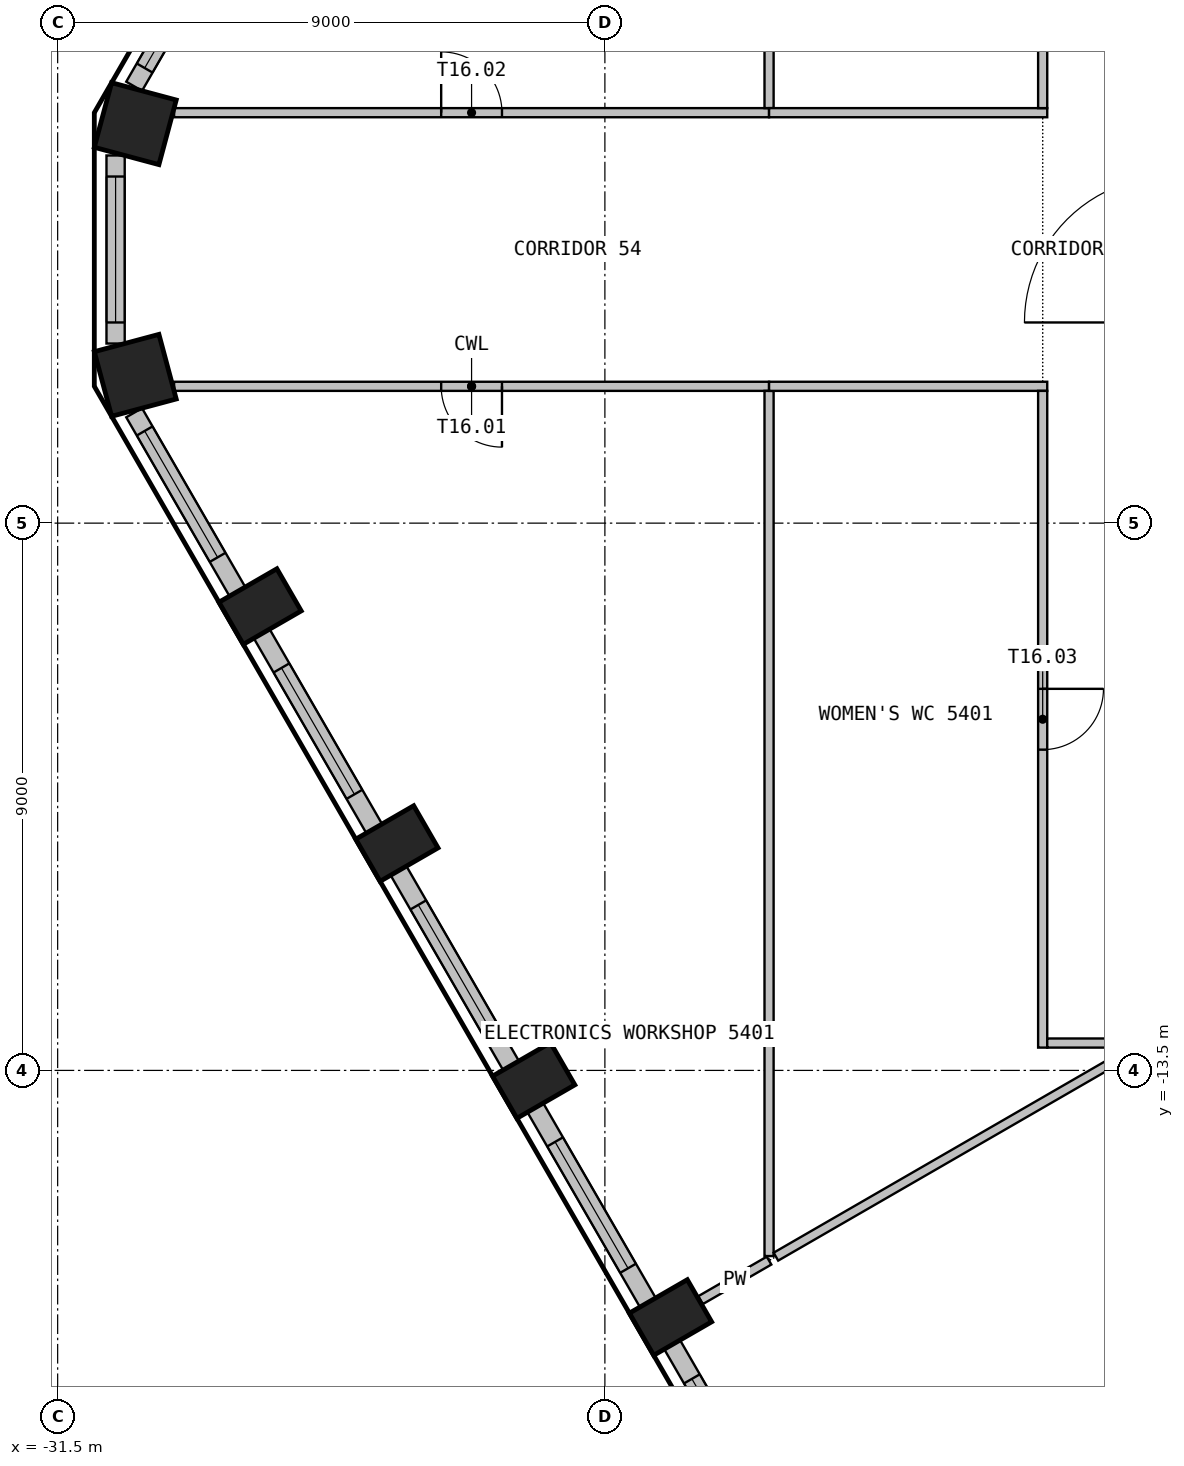
"""IFC4 building model, lengths in metres.
Left out: names, types, materials, properties, quantities, classifications, styles, units other than length and angle.
Written with IfcOpenShell. Run it as: python <this file> out.ifc"""

import sys

from ifc_helpers import new_model, si_unit, direction, frame, frame_2d, origin, origin_2d, place, context, subcontext, project, spatial, rectangle, extrude, element, fill, save


model = new_model("IFC4")
c1 = context("Model", 3, precision=1e-05, world=origin(), true_north=direction((0.0, 1.0)))
c2 = subcontext(c1, "Body", "Model", "MODEL_VIEW")
j1 = project(units=[si_unit("LENGTHUNIT", "METRE"), si_unit("PLANEANGLEUNIT", "RADIAN")], contexts=[c1])
p1 = place(None, origin())
s1 = spatial("IfcSite", under=j1, at=p1, CompositionType="ELEMENT")
p2 = place(p1, origin())
s2 = spatial("IfcBuilding", under=s1, at=p2, CompositionType="ELEMENT")
p3 = place(p2, frame((0.0, 0.0, 219.0)))
s3 = spatial("IfcBuildingStorey", under=s2, at=p3, CompositionType="ELEMENT", Elevation=219.0)
for number, where, z_axis, x_axis in (
    (1, (-30.223, 2.07, 0.0), (0.0, 0.0, 1.0), (-0.259, -0.966, 0.0)),
    (2, (-30.223, -2.07, 0.0), (0.0, 0.0, 1.0), (0.259, -0.966, 0.0)),
):
    element("IfcColumn", number, at=place(p3, frame(where, z_axis=z_axis, x_axis=x_axis)), inside=s3, PredefinedType="COLUMN", context=c2, shape_type="SweptSolid", body=[
        extrude(rectangle(XDim=1.1, YDim=1.1, at=origin_2d()), origin(), (0.0, 0.0, 1.0), 3.55),
    ])
for number, where, z_axis, x_axis in (
    (3, (-28.171, -5.872, 0.0), (0.0, 0.0, 1.0), (0.5, -0.866, 0.0)),
    (4, (-25.921, -9.769, 0.0), (0.0, 0.0, 1.0), (0.5, -0.866, 0.0)),
    (5, (-23.671, -13.666, 0.0), (0.0, 0.0, 1.0), (0.5, -0.866, 0.0)),
    (6, (-21.421, -17.563, 0.0), (0.0, 0.0, 1.0), (0.5, -0.866, 0.0)),
):
    element("IfcColumn", number, at=place(p3, frame(where, z_axis=z_axis, x_axis=x_axis)), inside=s3, PredefinedType="COLUMN", context=c2, shape_type="SweptSolid", body=[
        extrude(rectangle(XDim=0.8, YDim=1.1, at=origin_2d()), origin(), (0.0, 0.0, 1.0), 3.55),
    ])
p4 = place(p3, frame((-28.544, 5.625, 0.0), z_axis=(0.0, 0.0, 1.0), x_axis=(-0.500012868213, -0.866017974191, 0.0)))
e7 = element("IfcWall", 7, at=p4, inside=s3, PredefinedType="SOLIDWALL", context=c2, shape_type="SweptSolid", body=[
    extrude(rectangle(XDim=3.396, YDim=0.3, at=frame_2d((1.698, 0.0))), origin(), (0.0, 0.0, 1.0), 3.55),
])
p5 = place(p4, frame((0.649, 0.0, 0.9)))
e8 = element("IfcOpeningElement", 8, at=p5, cuts=e7, PredefinedType="OPENING", context=c2, shape_type="SweptSolid", body=[
    extrude(rectangle(XDim=2.4, YDim=2.1, at=frame_2d((1.2, 1.05))), frame((0.0, 0.16, 0.0), z_axis=(0.0, -1.0, 0.0), x_axis=(1.0, 0.0, 0.0)), (0.0, 0.0, 1.0), 0.32),
])
p6 = place(p3, frame((-30.547, 1.546, 0.0), z_axis=(0.0, 0.0, 1.0), x_axis=(0.0, -1.0, 0.0)))
e9 = element("IfcWall", 9, at=p6, inside=s3, PredefinedType="SOLIDWALL", context=c2, shape_type="SweptSolid", body=[
    extrude(rectangle(XDim=3.093, YDim=0.3, at=frame_2d((1.546, 0.0))), origin(), (0.0, 0.0, 1.0), 3.55),
])
p7 = place(p6, frame((0.346, 0.0, 0.9)))
e10 = element("IfcOpeningElement", 10, at=p7, cuts=e9, PredefinedType="OPENING", context=c2, shape_type="SweptSolid", body=[
    extrude(rectangle(XDim=2.4, YDim=2.1, at=frame_2d((1.2, 1.05))), frame((0.0, 0.16, 0.0), z_axis=(0.0, -1.0, 0.0), x_axis=(1.0, 0.0, 0.0)), (0.0, 0.0, 1.0), 0.32),
])
p8 = place(p3, frame((-30.242, -2.684, 0.0), z_axis=(0.0, 0.0, 1.0), x_axis=(0.500012868213, -0.866017974191, 0.0)))
e11 = element("IfcWall", 11, at=p8, inside=s3, PredefinedType="SOLIDWALL", context=c2, shape_type="SweptSolid", body=[
    extrude(rectangle(XDim=3.396, YDim=0.3, at=frame_2d((1.698, 0.0))), origin(), (0.0, 0.0, 1.0), 3.55),
])
p9 = place(p8, frame((0.346, 0.0, 0.9)))
e12 = element("IfcOpeningElement", 12, at=p9, cuts=e11, PredefinedType="OPENING", context=c2, shape_type="SweptSolid", body=[
    extrude(rectangle(XDim=2.4, YDim=2.1, at=frame_2d((1.2, 1.05))), frame((0.0, 0.16, 0.0), z_axis=(0.0, -1.0, 0.0), x_axis=(1.0, 0.0, 0.0)), (0.0, 0.0, 1.0), 0.32),
])
p10 = place(p3, frame((-28.144, -6.319, 0.0), z_axis=(0.0, 0.0, 1.0), x_axis=(0.500029062817, -0.866008623709, 0.0)))
e13 = element("IfcWall", 13, at=p10, inside=s3, PredefinedType="SOLIDWALL", context=c2, shape_type="SweptSolid", body=[
    extrude(rectangle(XDim=3.699, YDim=0.3, at=frame_2d((1.85, 0.0))), origin(), (0.0, 0.0, 1.0), 3.55),
])
p11 = place(p10, frame((0.649, 0.0, 0.9)))
e14 = element("IfcOpeningElement", 14, at=p11, cuts=e13, PredefinedType="OPENING", context=c2, shape_type="SweptSolid", body=[
    extrude(rectangle(XDim=2.4, YDim=2.1, at=frame_2d((1.2, 1.05))), frame((0.0, 0.16, 0.0), z_axis=(0.0, -1.0, 0.0), x_axis=(1.0, 0.0, 0.0)), (0.0, 0.0, 1.0), 0.32),
])
p12 = place(p3, frame((-25.894, -10.216, 0.0), z_axis=(0.0, 0.0, 1.0), x_axis=(0.500029062817, -0.866008623709, 0.0)))
e15 = element("IfcWall", 15, at=p12, inside=s3, PredefinedType="SOLIDWALL", context=c2, shape_type="SweptSolid", body=[
    extrude(rectangle(XDim=3.699, YDim=0.3, at=frame_2d((1.85, 0.0))), origin(), (0.0, 0.0, 1.0), 3.55),
])
p13 = place(p12, frame((0.649, 0.0, 0.9)))
e16 = element("IfcOpeningElement", 16, at=p13, cuts=e15, PredefinedType="OPENING", context=c2, shape_type="SweptSolid", body=[
    extrude(rectangle(XDim=2.4, YDim=2.1, at=frame_2d((1.2, 1.05))), frame((0.0, 0.16, 0.0), z_axis=(0.0, -1.0, 0.0), x_axis=(1.0, 0.0, 0.0)), (0.0, 0.0, 1.0), 0.32),
])
p14 = place(p3, frame((-23.644, -14.113, 0.0), z_axis=(0.0, 0.0, 1.0), x_axis=(0.500029062817, -0.866008623709, 0.0)))
e17 = element("IfcWall", 17, at=p14, inside=s3, PredefinedType="SOLIDWALL", context=c2, shape_type="SweptSolid", body=[
    extrude(rectangle(XDim=3.699, YDim=0.3, at=frame_2d((1.85, 0.0))), origin(), (0.0, 0.0, 1.0), 3.55),
])
p15 = place(p14, frame((0.649, 0.0, 0.9)))
e18 = element("IfcOpeningElement", 18, at=p15, cuts=e17, PredefinedType="OPENING", context=c2, shape_type="SweptSolid", body=[
    extrude(rectangle(XDim=2.4, YDim=2.1, at=frame_2d((1.2, 1.05))), frame((0.0, 0.16, 0.0), z_axis=(0.0, -1.0, 0.0), x_axis=(1.0, 0.0, 0.0)), (0.0, 0.0, 1.0), 0.32),
])
p16 = place(p3, frame((-21.394, -18.01, 0.0), z_axis=(0.0, 0.0, 1.0), x_axis=(0.500012868213, -0.866017974191, 0.0)))
e19 = element("IfcWall", 19, at=p16, inside=s3, PredefinedType="SOLIDWALL", context=c2, shape_type="SweptSolid", body=[
    extrude(rectangle(XDim=3.396, YDim=0.3, at=frame_2d((1.698, 0.0))), origin(), (0.0, 0.0, 1.0), 3.55),
])
p17 = place(p16, frame((0.649, 0.0, 0.9)))
e20 = element("IfcOpeningElement", 20, at=p17, cuts=e19, PredefinedType="OPENING", context=c2, shape_type="SweptSolid", body=[
    extrude(rectangle(XDim=2.4, YDim=2.1, at=frame_2d((1.2, 1.05))), frame((0.0, 0.16, 0.0), z_axis=(0.0, -1.0, 0.0), x_axis=(1.0, 0.0, 0.0)), (0.0, 0.0, 1.0), 0.32),
])
p18 = place(p3, frame((-19.8, -2.25, 0.0), z_axis=(0.0, 0.0, 1.0), x_axis=(-1.0, 0.0, 0.0)))
e21 = element("IfcWall", 21, at=p18, inside=s3, PredefinedType="PARTITIONING", context=c2, shape_type="SweptSolid", body=[
    extrude(rectangle(XDim=9.785, YDim=0.15, at=frame_2d((4.893, 0.0))), origin(), (0.0, 0.0, 1.0), 3.55),
])
p19 = place(p18, frame((4.393, 0.0, 0.0)))
e22 = element("IfcOpeningElement", 22, at=p19, cuts=e21, PredefinedType="OPENING", context=c2, shape_type="SweptSolid", body=[
    extrude(rectangle(XDim=1.0, YDim=2.1, at=frame_2d((0.5, 1.05))), frame((0.0, 0.085, 0.0), z_axis=(0.0, -1.0, 0.0), x_axis=(1.0, 0.0, 0.0)), (0.0, 0.0, 1.0), 0.17),
])
p20 = place(p3, frame((-29.585, 2.25, 0.0), z_axis=(0.0, 0.0, 1.0), x_axis=(1.0, 0.0, 0.0)))
e23 = element("IfcWall", 23, at=p20, inside=s3, PredefinedType="PARTITIONING", context=c2, shape_type="SweptSolid", body=[
    extrude(rectangle(XDim=9.785, YDim=0.15, at=frame_2d((4.893, 0.0))), origin(), (0.0, 0.0, 1.0), 3.55),
])
p21 = place(p20, frame((4.393, 0.0, 0.0)))
e24 = element("IfcOpeningElement", 24, at=p21, cuts=e23, PredefinedType="OPENING", context=c2, shape_type="SweptSolid", body=[
    extrude(rectangle(XDim=1.0, YDim=2.1, at=frame_2d((0.5, 1.05))), frame((0.0, 0.085, 0.0), z_axis=(0.0, -1.0, 0.0), x_axis=(1.0, 0.0, 0.0)), (0.0, 0.0, 1.0), 0.17),
])
p22 = place(p3, frame((-19.8, -16.628, 0.0), z_axis=(0.0, 0.0, 1.0), x_axis=(-0.866157475642, -0.499771175029, 0.0)))
e25 = element("IfcWall", 25, at=p22, inside=s3, PredefinedType="PARTITIONING", context=c2, shape_type="SweptSolid", body=[
    extrude(rectangle(XDim=1.301, YDim=0.15, at=frame_2d((0.651, 0.0))), origin(), (0.0, 0.0, 1.0), 3.55),
])
p23 = place(p3, frame((-19.8, -2.325, 0.0), z_axis=(0.0, 0.0, 1.0), x_axis=(0.0, -1.0, 0.0)))
e26 = element("IfcWall", 26, at=p23, inside=s3, PredefinedType="PARTITIONING", context=c2, shape_type="SweptSolid", body=[
    extrude(rectangle(XDim=14.228, YDim=0.15, at=frame_2d((7.114, 0.0))), origin(), (0.0, 0.0, 1.0), 3.55),
])
p24 = place(p3, frame((-13.668, -13.087, 0.0), z_axis=(0.0, 0.0, 1.0), x_axis=(-0.866012448988, -0.500022437694, 0.0)))
e27 = element("IfcWall", 27, at=p24, inside=s3, PredefinedType="PARTITIONING", context=c2, shape_type="SweptSolid", body=[
    extrude(rectangle(XDim=6.951, YDim=0.15, at=frame_2d((3.476, 0.0))), origin(), (0.0, 0.0, 1.0), 3.55),
])
p25 = place(p3, frame((-15.225, -2.25, 0.0), z_axis=(0.0, 0.0, 1.0), x_axis=(-1.0, 0.0, 0.0)))
e28 = element("IfcWall", 28, at=p25, inside=s3, PredefinedType="PARTITIONING", context=c2, shape_type="SweptSolid", body=[
    extrude(rectangle(XDim=4.575, YDim=0.15, at=frame_2d((2.288, 0.0))), origin(), (0.0, 0.0, 1.0), 3.55),
])
p26 = place(p3, frame((-19.8, 16.553, 0.0), z_axis=(0.0, 0.0, 1.0), x_axis=(0.0, -1.0, 0.0)))
e29 = element("IfcWall", 29, at=p26, inside=s3, PredefinedType="PARTITIONING", context=c2, shape_type="SweptSolid", body=[
    extrude(rectangle(XDim=14.228, YDim=0.15, at=frame_2d((7.114, 0.0))), origin(), (0.0, 0.0, 1.0), 3.55),
])
p27 = place(p3, frame((-19.8, 2.25, 0.0), z_axis=(0.0, 0.0, 1.0), x_axis=(1.0, 0.0, 0.0)))
e30 = element("IfcWall", 30, at=p27, inside=s3, PredefinedType="PARTITIONING", context=c2, shape_type="SweptSolid", body=[
    extrude(rectangle(XDim=4.575, YDim=0.15, at=frame_2d((2.288, 0.0))), origin(), (0.0, 0.0, 1.0), 3.55),
])
p28 = place(p3, frame((-15.3, -2.325, 0.0), z_axis=(0.0, 0.0, 1.0), x_axis=(0.0, -1.0, 0.0)))
e31 = element("IfcWall", 31, at=p28, inside=s3, PredefinedType="PARTITIONING", context=c2, shape_type="SweptSolid", body=[
    extrude(rectangle(XDim=10.8, YDim=0.15, at=frame_2d((5.4, 0.0))), origin(), (0.0, 0.0, 1.0), 3.55),
])
p29 = place(p28, frame((4.9, 0.0, 0.0)))
e32 = element("IfcOpeningElement", 32, at=p29, cuts=e31, PredefinedType="OPENING", context=c2, shape_type="SweptSolid", body=[
    extrude(rectangle(XDim=1.0, YDim=2.1, at=frame_2d((0.5, 1.05))), frame((0.0, 0.085, 0.0), z_axis=(0.0, -1.0, 0.0), x_axis=(1.0, 0.0, 0.0)), (0.0, 0.0, 1.0), 0.17),
])
p30 = place(p3, frame((-15.225, -13.05, 0.0), z_axis=(0.0, 0.0, 1.0), x_axis=(1.0, 0.0, 0.0)))
e33 = element("IfcWall", 33, at=p30, inside=s3, PredefinedType="PARTITIONING", context=c2, shape_type="SweptSolid", body=[
    extrude(rectangle(XDim=1.347, YDim=0.15, at=frame_2d((0.674, 0.0))), origin(), (0.0, 0.0, 1.0), 3.55),
])
p31 = place(p3, frame((-15.3, 13.125, 0.0), z_axis=(0.0, 0.0, 1.0), x_axis=(0.0, -1.0, 0.0)))
e34 = element("IfcWall", 34, at=p31, inside=s3, PredefinedType="PARTITIONING", context=c2, shape_type="SweptSolid", body=[
    extrude(rectangle(XDim=10.8, YDim=0.15, at=frame_2d((5.4, 0.0))), origin(), (0.0, 0.0, 1.0), 3.55),
])
p32 = place(p31, frame((4.9, 0.0, 0.0)))
e35 = element("IfcOpeningElement", 35, at=p32, cuts=e34, PredefinedType="OPENING", context=c2, shape_type="SweptSolid", body=[
    extrude(rectangle(XDim=1.0, YDim=2.1, at=frame_2d((0.5, 1.05))), frame((0.0, 0.085, 0.0), z_axis=(0.0, -1.0, 0.0), x_axis=(1.0, 0.0, 0.0)), (0.0, 0.0, 1.0), 0.17),
])
p33 = place(p5, origin())
e36 = element("IfcWindow", 36, at=p33, inside=s3, PartitioningType="SINGLE_PANEL", PredefinedType="WINDOW", context=c2, shape_type="SweptSolid", body=[
    extrude(rectangle(XDim=2.4, YDim=2.1, at=frame_2d((1.2, 1.05))), frame((0.0, 0.03, 0.0), z_axis=(0.0, -1.0, 0.0), x_axis=(1.0, 0.0, 0.0)), (0.0, 0.0, 1.0), 0.06),
])
fill(e8, e36)
p34 = place(p7, origin())
e37 = element("IfcWindow", 37, at=p34, inside=s3, PartitioningType="SINGLE_PANEL", PredefinedType="WINDOW", context=c2, shape_type="SweptSolid", body=[
    extrude(rectangle(XDim=2.4, YDim=2.1, at=frame_2d((1.2, 1.05))), frame((0.0, 0.03, 0.0), z_axis=(0.0, -1.0, 0.0), x_axis=(1.0, 0.0, 0.0)), (0.0, 0.0, 1.0), 0.06),
])
fill(e10, e37)
p35 = place(p9, origin())
e38 = element("IfcWindow", 38, at=p35, inside=s3, PartitioningType="SINGLE_PANEL", PredefinedType="WINDOW", context=c2, shape_type="SweptSolid", body=[
    extrude(rectangle(XDim=2.4, YDim=2.1, at=frame_2d((1.2, 1.05))), frame((0.0, 0.03, 0.0), z_axis=(0.0, -1.0, 0.0), x_axis=(1.0, 0.0, 0.0)), (0.0, 0.0, 1.0), 0.06),
])
fill(e12, e38)
p36 = place(p11, origin())
e39 = element("IfcWindow", 39, at=p36, inside=s3, PartitioningType="SINGLE_PANEL", PredefinedType="WINDOW", context=c2, shape_type="SweptSolid", body=[
    extrude(rectangle(XDim=2.4, YDim=2.1, at=frame_2d((1.2, 1.05))), frame((0.0, 0.03, 0.0), z_axis=(0.0, -1.0, 0.0), x_axis=(1.0, 0.0, 0.0)), (0.0, 0.0, 1.0), 0.06),
])
fill(e14, e39)
p37 = place(p13, origin())
e40 = element("IfcWindow", 40, at=p37, inside=s3, PartitioningType="SINGLE_PANEL", PredefinedType="WINDOW", context=c2, shape_type="SweptSolid", body=[
    extrude(rectangle(XDim=2.4, YDim=2.1, at=frame_2d((1.2, 1.05))), frame((0.0, 0.03, 0.0), z_axis=(0.0, -1.0, 0.0), x_axis=(1.0, 0.0, 0.0)), (0.0, 0.0, 1.0), 0.06),
])
fill(e16, e40)
p38 = place(p15, origin())
e41 = element("IfcWindow", 41, at=p38, inside=s3, PartitioningType="SINGLE_PANEL", PredefinedType="WINDOW", context=c2, shape_type="SweptSolid", body=[
    extrude(rectangle(XDim=2.4, YDim=2.1, at=frame_2d((1.2, 1.05))), frame((0.0, 0.03, 0.0), z_axis=(0.0, -1.0, 0.0), x_axis=(1.0, 0.0, 0.0)), (0.0, 0.0, 1.0), 0.06),
])
fill(e18, e41)
p39 = place(p17, origin())
e42 = element("IfcWindow", 42, at=p39, inside=s3, PartitioningType="SINGLE_PANEL", PredefinedType="WINDOW", context=c2, shape_type="SweptSolid", body=[
    extrude(rectangle(XDim=2.4, YDim=2.1, at=frame_2d((1.2, 1.05))), frame((0.0, 0.03, 0.0), z_axis=(0.0, -1.0, 0.0), x_axis=(1.0, 0.0, 0.0)), (0.0, 0.0, 1.0), 0.06),
])
fill(e20, e42)
p40 = place(p19, origin())
e43 = element("IfcDoor", 43, at=p40, inside=s3, OperationType="SINGLE_SWING_RIGHT", PredefinedType="DOOR", context=c2, shape_type="SweptSolid", body=[
    extrude(rectangle(XDim=1.0, YDim=2.1, at=frame_2d((0.5, 1.05))), frame((0.0, 0.025, 0.0), z_axis=(0.0, -1.0, 0.0), x_axis=(1.0, 0.0, 0.0)), (0.0, 0.0, 1.0), 0.05),
])
fill(e22, e43)
p41 = place(p21, origin())
e44 = element("IfcDoor", 44, at=p41, inside=s3, OperationType="SINGLE_SWING_LEFT", PredefinedType="DOOR", context=c2, shape_type="SweptSolid", body=[
    extrude(rectangle(XDim=1.0, YDim=2.1, at=frame_2d((0.5, 1.05))), frame((0.0, 0.025, 0.0), z_axis=(0.0, -1.0, 0.0), x_axis=(1.0, 0.0, 0.0)), (0.0, 0.0, 1.0), 0.05),
])
fill(e24, e44)
p42 = place(p29, origin())
e45 = element("IfcDoor", 45, at=p42, inside=s3, OperationType="SINGLE_SWING_RIGHT", PredefinedType="DOOR", context=c2, shape_type="SweptSolid", body=[
    extrude(rectangle(XDim=1.0, YDim=2.1, at=frame_2d((0.5, 1.05))), frame((0.0, 0.025, 0.0), z_axis=(0.0, -1.0, 0.0), x_axis=(1.0, 0.0, 0.0)), (0.0, 0.0, 1.0), 0.05),
])
fill(e32, e45)
save(model, sys.argv[1])
